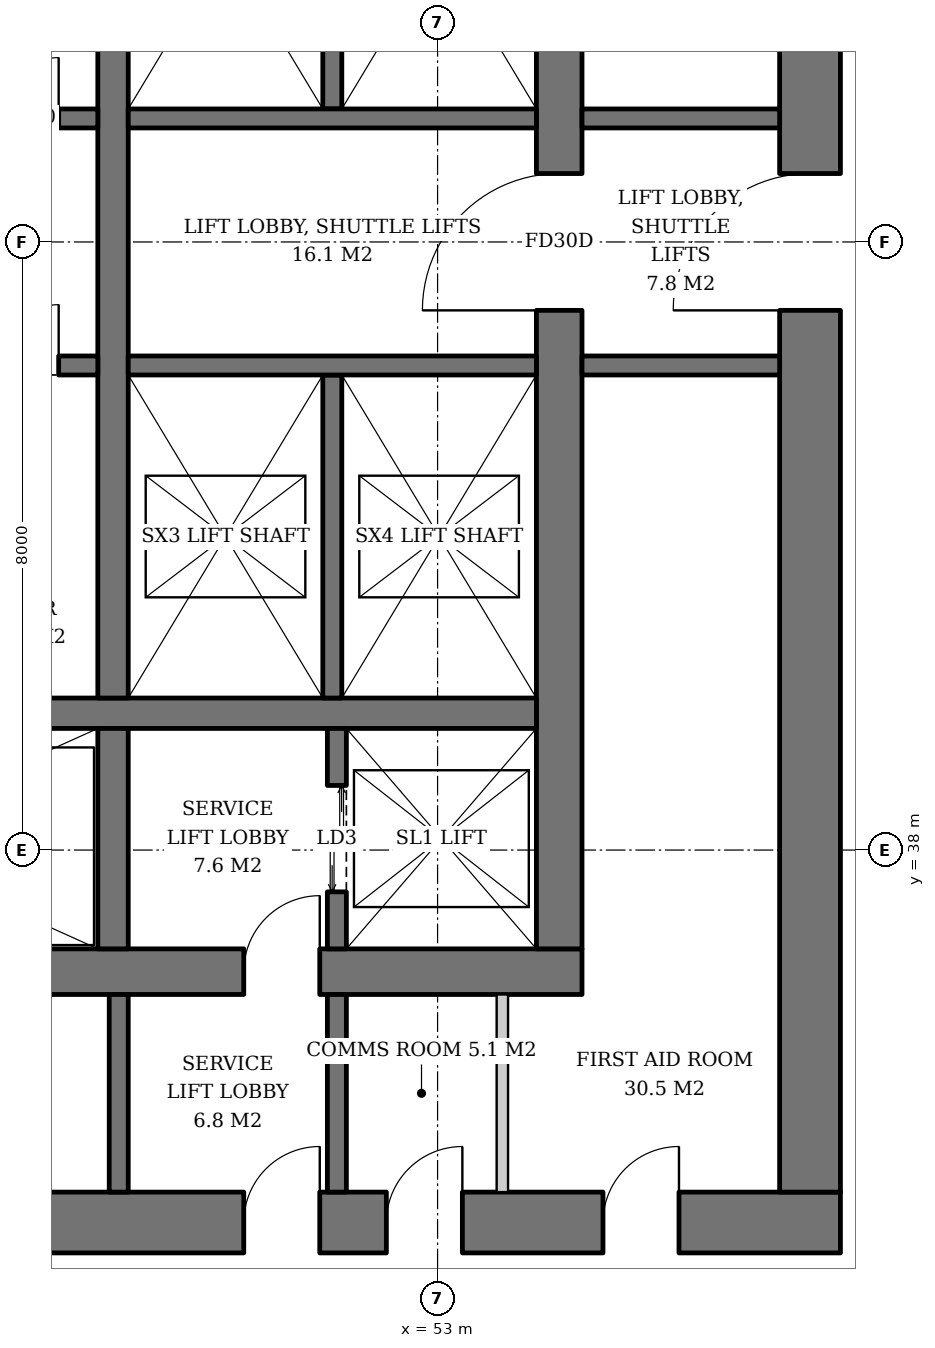
"""IFC4 building model, lengths in metres.
Left out: names, types, materials, properties, quantities, classifications, styles, units other than length and angle.
Written with IfcOpenShell. Run it as: python <this file> out.ifc"""

import sys

from ifc_helpers import new_model, si_unit, direction, frame, frame_2d, origin, place, context, subcontext, project, spatial, rectangle, extrude, element, fill, save


model = new_model("IFC4")
c1 = context("Model", 3, precision=1e-05, world=origin(), true_north=direction((0.0, 1.0)))
c2 = subcontext(c1, "Body", "Model", "MODEL_VIEW")
j1 = project(units=[si_unit("LENGTHUNIT", "METRE"), si_unit("PLANEANGLEUNIT", "RADIAN")], contexts=[c1])
p1 = place(None, origin())
s1 = spatial("IfcSite", under=j1, at=p1, CompositionType="ELEMENT")
p2 = place(p1, origin())
s2 = spatial("IfcBuilding", under=s1, at=p2, CompositionType="ELEMENT")
p3 = place(p2, frame((0.0, 0.0, 32.4)))
s3 = spatial("IfcBuildingStorey", under=s2, at=p3, CompositionType="ELEMENT", Elevation=32.4)
p4 = place(p3, frame((35.1, 36.4, 0.0), z_axis=(0.0, 0.0, 1.0), x_axis=(1.0, 0.0, 0.0)))
e1 = element("IfcWall", 1, at=p4, inside=s3, PredefinedType="SHEAR", context=c2, shape_type="SweptSolid", body=[
    extrude(rectangle(XDim=19.8, YDim=0.6, at=frame_2d((9.9, 0.0))), origin(), (0.0, 0.0, 1.0), 3.8),
])
p5 = place(p4, frame((3.9, 0.0, 0.0)))
e2 = element("IfcOpeningElement", 2, at=p5, cuts=e1, PredefinedType="OPENING", context=c2, shape_type="SweptSolid", body=[
    extrude(rectangle(XDim=1.0, YDim=2.1, at=frame_2d((0.5, 1.05))), frame((0.0, 0.31, 0.0), z_axis=(0.0, -1.0, 0.0), x_axis=(1.0, 0.0, 0.0)), (0.0, 0.0, 1.0), 0.62),
])
p6 = place(p4, frame((15.35, 0.0, 0.0)))
e3 = element("IfcOpeningElement", 3, at=p6, cuts=e1, PredefinedType="OPENING", context=c2, shape_type="SweptSolid", body=[
    extrude(rectangle(XDim=1.0, YDim=2.1, at=frame_2d((0.5, 1.05))), frame((0.0, 0.31, 0.0), z_axis=(0.0, -1.0, 0.0), x_axis=(1.0, 0.0, 0.0)), (0.0, 0.0, 1.0), 0.62),
])
p7 = place(p3, frame((54.6, 36.7, 0.0), z_axis=(0.0, 0.0, 1.0), x_axis=(0.0, 1.0, 0.0)))
e4 = element("IfcWall", 4, at=p7, inside=s3, PredefinedType="SHEAR", context=c2, shape_type="SweptSolid", body=[
    extrude(rectangle(XDim=18.6, YDim=0.6, at=frame_2d((9.3, 0.0))), origin(), (0.0, 0.0, 1.0), 3.8),
])
p8 = place(p7, frame((8.4, 0.0, 0.0)))
e5 = element("IfcOpeningElement", 5, at=p8, cuts=e4, PredefinedType="OPENING", context=c2, shape_type="SweptSolid", body=[
    extrude(rectangle(XDim=1.8, YDim=2.4, at=frame_2d((0.9, 1.2))), frame((0.0, 0.31, 0.0), z_axis=(0.0, -1.0, 0.0), x_axis=(1.0, 0.0, 0.0)), (0.0, 0.0, 1.0), 0.62),
])
p9 = place(p3, frame((31.7, 33.1, 0.0), z_axis=(0.0, 0.0, 1.0), x_axis=(1.0, 0.0, 0.0)))
e6 = element("IfcWall", 6, at=p9, inside=s3, PredefinedType="SHEAR", context=c2, shape_type="SweptSolid", body=[
    extrude(rectangle(XDim=26.6, YDim=0.8, at=frame_2d((13.3, 0.0))), origin(), (0.0, 0.0, 1.0), 3.8),
])
p10 = place(p9, frame((7.3, 0.0, 0.0)))
e7 = element("IfcOpeningElement", 7, at=p10, cuts=e6, PredefinedType="OPENING", context=c2, shape_type="SweptSolid", body=[
    extrude(rectangle(XDim=1.0, YDim=2.1, at=frame_2d((0.5, 1.05))), frame((0.0, 0.41, 0.0), z_axis=(0.0, -1.0, 0.0), x_axis=(1.0, 0.0, 0.0)), (0.0, 0.0, 1.0), 0.82),
])
p11 = place(p9, frame((18.75, 0.0, 0.0)))
e8 = element("IfcOpeningElement", 8, at=p11, cuts=e6, PredefinedType="OPENING", context=c2, shape_type="SweptSolid", body=[
    extrude(rectangle(XDim=1.0, YDim=2.1, at=frame_2d((0.5, 1.05))), frame((0.0, 0.41, 0.0), z_axis=(0.0, -1.0, 0.0), x_axis=(1.0, 0.0, 0.0)), (0.0, 0.0, 1.0), 0.82),
])
p12 = place(p9, frame((1.9, 0.0, 0.0)))
e9 = element("IfcOpeningElement", 9, at=p12, cuts=e6, PredefinedType="OPENING", context=c2, shape_type="SweptSolid", body=[
    extrude(rectangle(XDim=1.0, YDim=2.1, at=frame_2d((0.5, 1.05))), frame((0.0, 0.41, 0.0), z_axis=(0.0, -1.0, 0.0), x_axis=(1.0, 0.0, 0.0)), (0.0, 0.0, 1.0), 0.82),
])
p13 = place(p9, frame((4.725, 0.0, 0.0)))
e10 = element("IfcOpeningElement", 10, at=p13, cuts=e6, PredefinedType="OPENING", context=c2, shape_type="SweptSolid", body=[
    extrude(rectangle(XDim=1.0, YDim=2.1, at=frame_2d((0.5, 1.05))), frame((0.0, 0.41, 0.0), z_axis=(0.0, -1.0, 0.0), x_axis=(1.0, 0.0, 0.0)), (0.0, 0.0, 1.0), 0.82),
])
p14 = place(p9, frame((12.44, 0.0, 0.0)))
e11 = element("IfcOpeningElement", 11, at=p14, cuts=e6, PredefinedType="OPENING", context=c2, shape_type="SweptSolid", body=[
    extrude(rectangle(XDim=1.0, YDim=2.1, at=frame_2d((0.5, 1.05))), frame((0.0, 0.41, 0.0), z_axis=(0.0, -1.0, 0.0), x_axis=(1.0, 0.0, 0.0)), (0.0, 0.0, 1.0), 0.82),
])
p15 = place(p9, frame((20.626, 0.0, 0.0)))
e12 = element("IfcOpeningElement", 12, at=p15, cuts=e6, PredefinedType="OPENING", context=c2, shape_type="SweptSolid", body=[
    extrude(rectangle(XDim=1.0, YDim=2.1, at=frame_2d((0.5, 1.05))), frame((0.0, 0.41, 0.0), z_axis=(0.0, -1.0, 0.0), x_axis=(1.0, 0.0, 0.0)), (0.0, 0.0, 1.0), 0.82),
])
p16 = place(p9, frame((23.476, 0.0, 0.0)))
e13 = element("IfcOpeningElement", 13, at=p16, cuts=e6, PredefinedType="OPENING", context=c2, shape_type="SweptSolid", body=[
    extrude(rectangle(XDim=1.0, YDim=2.1, at=frame_2d((0.5, 1.05))), frame((0.0, 0.41, 0.0), z_axis=(0.0, -1.0, 0.0), x_axis=(1.0, 0.0, 0.0)), (0.0, 0.0, 1.0), 0.82),
])
p17 = place(p3, frame((57.9, 33.5, 0.0), z_axis=(0.0, 0.0, 1.0), x_axis=(0.0, 1.0, 0.0)))
e14 = element("IfcWall", 14, at=p17, inside=s3, PredefinedType="SHEAR", context=c2, shape_type="SweptSolid", body=[
    extrude(rectangle(XDim=25.0, YDim=0.8, at=frame_2d((12.5, 0.0))), origin(), (0.0, 0.0, 1.0), 3.8),
])
p18 = place(p17, frame((11.6, 0.0, 0.0)))
e15 = element("IfcOpeningElement", 15, at=p18, cuts=e14, PredefinedType="OPENING", context=c2, shape_type="SweptSolid", body=[
    extrude(rectangle(XDim=1.8, YDim=2.4, at=frame_2d((0.9, 1.2))), frame((0.0, 0.41, 0.0), z_axis=(0.0, -1.0, 0.0), x_axis=(1.0, 0.0, 0.0)), (0.0, 0.0, 1.0), 0.82),
])
p19 = place(p3, frame((35.7, 39.8, 0.0), z_axis=(0.0, 0.0, 1.0), x_axis=(1.0, 0.0, 0.0)))
e16 = element("IfcWall", 16, at=p19, inside=s3, PredefinedType="SHEAR", context=c2, shape_type="SweptSolid", body=[
    extrude(rectangle(XDim=18.6, YDim=0.4, at=frame_2d((9.3, 0.0))), origin(), (0.0, 0.0, 1.0), 3.8),
])
p20 = place(p3, frame((48.73, 36.7, 0.0), z_axis=(0.0, 0.0, 1.0), x_axis=(0.0, 1.0, 0.0)))
e17 = element("IfcWall", 17, at=p20, inside=s3, PredefinedType="SHEAR", context=c2, shape_type="SweptSolid", body=[
    extrude(rectangle(XDim=2.9, YDim=0.4, at=frame_2d((1.45, 0.0))), origin(), (0.0, 0.0, 1.0), 3.8),
])
p21 = place(p3, frame((48.73, 40.0, 0.0), z_axis=(0.0, 0.0, 1.0), x_axis=(0.0, 1.0, 0.0)))
e18 = element("IfcWall", 18, at=p21, inside=s3, PredefinedType="SHEAR", context=c2, shape_type="SweptSolid", body=[
    extrude(rectangle(XDim=12.0, YDim=0.4, at=frame_2d((6.0, 0.0))), origin(), (0.0, 0.0, 1.0), 3.8),
])
p22 = place(p3, frame((51.675, 36.7, 0.0), z_axis=(0.0, 0.0, 1.0), x_axis=(0.0, 1.0, 0.0)))
e19 = element("IfcWall", 19, at=p22, inside=s3, PredefinedType="SHEAR", context=c2, shape_type="SweptSolid", body=[
    extrude(rectangle(XDim=2.9, YDim=0.25, at=frame_2d((1.45, 0.0))), origin(), (0.0, 0.0, 1.0), 3.8),
])
p23 = place(p22, frame((0.75, 0.0, 0.0)))
e20 = element("IfcOpeningElement", 20, at=p23, cuts=e19, PredefinedType="OPENING", context=c2, shape_type="SweptSolid", body=[
    extrude(rectangle(XDim=1.4, YDim=2.4, at=frame_2d((0.7, 1.2))), frame((0.0, 0.135, 0.0), z_axis=(0.0, -1.0, 0.0), x_axis=(1.0, 0.0, 0.0)), (0.0, 0.0, 1.0), 0.27),
])
p24 = place(p3, frame((35.7, 47.625, 0.0), z_axis=(0.0, 0.0, 1.0), x_axis=(1.0, 0.0, 0.0)))
e21 = element("IfcWall", 21, at=p24, inside=s3, PredefinedType="SHEAR", context=c2, shape_type="SweptSolid", body=[
    extrude(rectangle(XDim=12.83, YDim=0.25, at=frame_2d((6.415, 0.0))), origin(), (0.0, 0.0, 1.0), 3.8),
])
p25 = place(p24, frame((0.7, 0.0, 0.0)))
e22 = element("IfcOpeningElement", 22, at=p25, cuts=e21, PredefinedType="OPENING", context=c2, shape_type="SweptSolid", body=[
    extrude(rectangle(XDim=1.1, YDim=2.2, at=frame_2d((0.55, 1.1))), frame((0.0, 0.135, 0.0), z_axis=(0.0, -1.0, 0.0), x_axis=(1.0, 0.0, 0.0)), (0.0, 0.0, 1.0), 0.27),
])
p26 = place(p24, frame((3.45, 0.0, 0.0)))
e23 = element("IfcOpeningElement", 23, at=p26, cuts=e21, PredefinedType="OPENING", context=c2, shape_type="SweptSolid", body=[
    extrude(rectangle(XDim=1.1, YDim=2.2, at=frame_2d((0.55, 1.1))), frame((0.0, 0.135, 0.0), z_axis=(0.0, -1.0, 0.0), x_axis=(1.0, 0.0, 0.0)), (0.0, 0.0, 1.0), 0.27),
])
p27 = place(p24, frame((6.2, 0.0, 0.0)))
e24 = element("IfcOpeningElement", 24, at=p27, cuts=e21, PredefinedType="OPENING", context=c2, shape_type="SweptSolid", body=[
    extrude(rectangle(XDim=1.1, YDim=2.2, at=frame_2d((0.55, 1.1))), frame((0.0, 0.135, 0.0), z_axis=(0.0, -1.0, 0.0), x_axis=(1.0, 0.0, 0.0)), (0.0, 0.0, 1.0), 0.27),
])
p28 = place(p24, frame((8.95, 0.0, 0.0)))
e25 = element("IfcOpeningElement", 25, at=p28, cuts=e21, PredefinedType="OPENING", context=c2, shape_type="SweptSolid", body=[
    extrude(rectangle(XDim=1.1, YDim=2.2, at=frame_2d((0.55, 1.1))), frame((0.0, 0.135, 0.0), z_axis=(0.0, -1.0, 0.0), x_axis=(1.0, 0.0, 0.0)), (0.0, 0.0, 1.0), 0.27),
])
p29 = place(p24, frame((11.515, 0.0, 0.0)))
e26 = element("IfcOpeningElement", 26, at=p29, cuts=e21, PredefinedType="OPENING", context=c2, shape_type="SweptSolid", body=[
    extrude(rectangle(XDim=0.8, YDim=2.0, at=frame_2d((0.4, 1.0))), frame((0.0, 0.135, 0.0), z_axis=(0.0, -1.0, 0.0), x_axis=(1.0, 0.0, 0.0)), (0.0, 0.0, 1.0), 0.27),
])
p30 = place(p3, frame((35.7, 44.375, 0.0), z_axis=(0.0, 0.0, 1.0), x_axis=(1.0, 0.0, 0.0)))
e27 = element("IfcWall", 27, at=p30, inside=s3, PredefinedType="SHEAR", context=c2, shape_type="SweptSolid", body=[
    extrude(rectangle(XDim=12.83, YDim=0.25, at=frame_2d((6.415, 0.0))), origin(), (0.0, 0.0, 1.0), 3.8),
])
p31 = place(p30, frame((0.7, 0.0, 0.0)))
e28 = element("IfcOpeningElement", 28, at=p31, cuts=e27, PredefinedType="OPENING", context=c2, shape_type="SweptSolid", body=[
    extrude(rectangle(XDim=1.1, YDim=2.2, at=frame_2d((0.55, 1.1))), frame((0.0, 0.135, 0.0), z_axis=(0.0, -1.0, 0.0), x_axis=(1.0, 0.0, 0.0)), (0.0, 0.0, 1.0), 0.27),
])
p32 = place(p30, frame((3.45, 0.0, 0.0)))
e29 = element("IfcOpeningElement", 29, at=p32, cuts=e27, PredefinedType="OPENING", context=c2, shape_type="SweptSolid", body=[
    extrude(rectangle(XDim=1.1, YDim=2.2, at=frame_2d((0.55, 1.1))), frame((0.0, 0.135, 0.0), z_axis=(0.0, -1.0, 0.0), x_axis=(1.0, 0.0, 0.0)), (0.0, 0.0, 1.0), 0.27),
])
p33 = place(p30, frame((6.2, 0.0, 0.0)))
e30 = element("IfcOpeningElement", 30, at=p33, cuts=e27, PredefinedType="OPENING", context=c2, shape_type="SweptSolid", body=[
    extrude(rectangle(XDim=1.1, YDim=2.2, at=frame_2d((0.55, 1.1))), frame((0.0, 0.135, 0.0), z_axis=(0.0, -1.0, 0.0), x_axis=(1.0, 0.0, 0.0)), (0.0, 0.0, 1.0), 0.27),
])
p34 = place(p30, frame((8.95, 0.0, 0.0)))
e31 = element("IfcOpeningElement", 31, at=p34, cuts=e27, PredefinedType="OPENING", context=c2, shape_type="SweptSolid", body=[
    extrude(rectangle(XDim=1.1, YDim=2.2, at=frame_2d((0.55, 1.1))), frame((0.0, 0.135, 0.0), z_axis=(0.0, -1.0, 0.0), x_axis=(1.0, 0.0, 0.0)), (0.0, 0.0, 1.0), 0.27),
])
p35 = place(p30, frame((11.515, 0.0, 0.0)))
e32 = element("IfcOpeningElement", 32, at=p35, cuts=e27, PredefinedType="OPENING", context=c2, shape_type="SweptSolid", body=[
    extrude(rectangle(XDim=0.8, YDim=2.0, at=frame_2d((0.4, 1.0))), frame((0.0, 0.135, 0.0), z_axis=(0.0, -1.0, 0.0), x_axis=(1.0, 0.0, 0.0)), (0.0, 0.0, 1.0), 0.27),
])
p36 = place(p3, frame((51.615, 47.75, 0.0), z_axis=(0.0, 0.0, 1.0), x_axis=(0.0, 1.0, 0.0)))
e33 = element("IfcWall", 33, at=p36, inside=s3, PredefinedType="SHEAR", context=c2, shape_type="SweptSolid", body=[
    extrude(rectangle(XDim=4.25, YDim=0.25, at=frame_2d((2.125, 0.0))), origin(), (0.0, 0.0, 1.0), 3.8),
])
p37 = place(p3, frame((48.93, 47.625, 0.0), z_axis=(0.0, 0.0, 1.0), x_axis=(1.0, 0.0, 0.0)))
e34 = element("IfcWall", 34, at=p37, inside=s3, PredefinedType="SHEAR", context=c2, shape_type="SweptSolid", body=[
    extrude(rectangle(XDim=5.37, YDim=0.25, at=frame_2d((2.685, 0.0))), origin(), (0.0, 0.0, 1.0), 3.8),
])
p38 = place(p3, frame((51.615, 44.25, 0.0), z_axis=(0.0, 0.0, 1.0), x_axis=(0.0, -1.0, 0.0)))
e35 = element("IfcWall", 35, at=p38, inside=s3, PredefinedType="SHEAR", context=c2, shape_type="SweptSolid", body=[
    extrude(rectangle(XDim=4.25, YDim=0.25, at=frame_2d((2.125, 0.0))), origin(), (0.0, 0.0, 1.0), 3.8),
])
p39 = place(p3, frame((48.93, 44.375, 0.0), z_axis=(0.0, 0.0, 1.0), x_axis=(1.0, 0.0, 0.0)))
e36 = element("IfcWall", 36, at=p39, inside=s3, PredefinedType="SHEAR", context=c2, shape_type="SweptSolid", body=[
    extrude(rectangle(XDim=5.37, YDim=0.25, at=frame_2d((2.685, 0.0))), origin(), (0.0, 0.0, 1.0), 3.8),
])
for number, where, z_axis, x_axis in (
    (37, (54.9, 44.375, 0.0), (0.0, 0.0, 1.0), (1.0, 0.0, 0.0)),
    (38, (54.9, 47.625, 0.0), (0.0, 0.0, 1.0), (1.0, 0.0, 0.0)),
    (39, (48.805, 33.5, 0.0), (0.0, 0.0, 1.0), (0.0, 1.0, 0.0)),
    (40, (51.675, 33.5, 0.0), (0.0, 0.0, 1.0), (0.0, 1.0, 0.0)),
):
    element("IfcWall", number, at=place(p3, frame(where, z_axis=z_axis, x_axis=x_axis)), inside=s3, PredefinedType="SOLIDWALL", context=c2, shape_type="SweptSolid", body=[
        extrude(rectangle(XDim=2.6, YDim=0.25, at=frame_2d((1.3, 0.0))), origin(), (0.0, 0.0, 1.0), 3.62),
    ])
p40 = place(p3, frame((53.852, 33.5, 0.0), z_axis=(0.0, 0.0, 1.0), x_axis=(0.0, 1.0, 0.0)))
e41 = element("IfcWall", 41, at=p40, inside=s3, PredefinedType="SOLIDWALL", context=c2, shape_type="SweptSolid", body=[
    extrude(rectangle(XDim=2.6, YDim=0.15, at=frame_2d((1.3, 0.0))), origin(), (0.0, 0.0, 1.0), 3.62),
])
p41 = place(p23, origin())
e42 = element("IfcDoor", 42, at=p41, inside=s3, OperationType="DOUBLE_DOOR_SLIDING", PredefinedType="DOOR", context=c2, shape_type="SweptSolid", body=[
    extrude(rectangle(XDim=1.4, YDim=2.4, at=frame_2d((0.7, 1.2))), frame((0.0, 0.025, 0.0), z_axis=(0.0, -1.0, 0.0), x_axis=(1.0, 0.0, 0.0)), (0.0, 0.0, 1.0), 0.05),
])
fill(e20, e42)
p42 = place(p29, origin())
e43 = element("IfcDoor", 43, at=p42, inside=s3, OperationType="SINGLE_SWING_RIGHT", PredefinedType="DOOR", context=c2, shape_type="SweptSolid", body=[
    extrude(rectangle(XDim=0.8, YDim=2.0, at=frame_2d((0.4, 1.0))), frame((0.0, 0.025, 0.0), z_axis=(0.0, -1.0, 0.0), x_axis=(1.0, 0.0, 0.0)), (0.0, 0.0, 1.0), 0.05),
])
fill(e26, e43)
p43 = place(p35, origin())
e44 = element("IfcDoor", 44, at=p43, inside=s3, OperationType="SINGLE_SWING_RIGHT", PredefinedType="DOOR", context=c2, shape_type="SweptSolid", body=[
    extrude(rectangle(XDim=0.8, YDim=2.0, at=frame_2d((0.4, 1.0))), frame((0.0, 0.025, 0.0), z_axis=(0.0, -1.0, 0.0), x_axis=(1.0, 0.0, 0.0)), (0.0, 0.0, 1.0), 0.05),
])
fill(e32, e44)
p44 = place(p8, origin())
e45 = element("IfcDoor", 45, at=p44, inside=s3, OperationType="DOUBLE_DOOR_SINGLE_SWING", PredefinedType="DOOR", context=c2, shape_type="SweptSolid", body=[
    extrude(rectangle(XDim=1.8, YDim=2.4, at=frame_2d((0.9, 1.2))), frame((0.0, 0.025, 0.0), z_axis=(0.0, -1.0, 0.0), x_axis=(1.0, 0.0, 0.0)), (0.0, 0.0, 1.0), 0.05),
])
fill(e5, e45)
p45 = place(p6, origin())
e46 = element("IfcDoor", 46, at=p45, inside=s3, OperationType="SINGLE_SWING_RIGHT", PredefinedType="DOOR", context=c2, shape_type="SweptSolid", body=[
    extrude(rectangle(XDim=1.0, YDim=2.1, at=frame_2d((0.5, 1.05))), frame((0.0, 0.025, 0.0), z_axis=(0.0, -1.0, 0.0), x_axis=(1.0, 0.0, 0.0)), (0.0, 0.0, 1.0), 0.05),
])
fill(e3, e46)
p46 = place(p18, origin())
e47 = element("IfcDoor", 47, at=p46, inside=s3, OperationType="DOUBLE_DOOR_SINGLE_SWING", PredefinedType="DOOR", context=c2, shape_type="SweptSolid", body=[
    extrude(rectangle(XDim=1.8, YDim=2.4, at=frame_2d((0.9, 1.2))), frame((0.0, 0.025, 0.0), z_axis=(0.0, -1.0, 0.0), x_axis=(1.0, 0.0, 0.0)), (0.0, 0.0, 1.0), 0.05),
])
fill(e15, e47)
p47 = place(p11, origin())
e48 = element("IfcDoor", 48, at=p47, inside=s3, OperationType="SINGLE_SWING_RIGHT", PredefinedType="DOOR", context=c2, shape_type="SweptSolid", body=[
    extrude(rectangle(XDim=1.0, YDim=2.1, at=frame_2d((0.5, 1.05))), frame((0.0, 0.025, 0.0), z_axis=(0.0, -1.0, 0.0), x_axis=(1.0, 0.0, 0.0)), (0.0, 0.0, 1.0), 0.05),
])
fill(e8, e48)
p48 = place(p15, origin())
e49 = element("IfcDoor", 49, at=p48, inside=s3, OperationType="SINGLE_SWING_RIGHT", PredefinedType="DOOR", context=c2, shape_type="SweptSolid", body=[
    extrude(rectangle(XDim=1.0, YDim=2.1, at=frame_2d((0.5, 1.05))), frame((0.0, 0.39, 0.0), z_axis=(0.0, -1.0, 0.0), x_axis=(1.0, 0.0, 0.0)), (0.0, 0.0, 1.0), 0.05),
])
fill(e12, e49)
p49 = place(p16, origin())
e50 = element("IfcDoor", 50, at=p49, inside=s3, OperationType="SINGLE_SWING_RIGHT", PredefinedType="DOOR", context=c2, shape_type="SweptSolid", body=[
    extrude(rectangle(XDim=1.0, YDim=2.1, at=frame_2d((0.5, 1.05))), frame((0.0, 0.39, 0.0), z_axis=(0.0, -1.0, 0.0), x_axis=(1.0, 0.0, 0.0)), (0.0, 0.0, 1.0), 0.05),
])
fill(e13, e50)
save(model, sys.argv[1])
